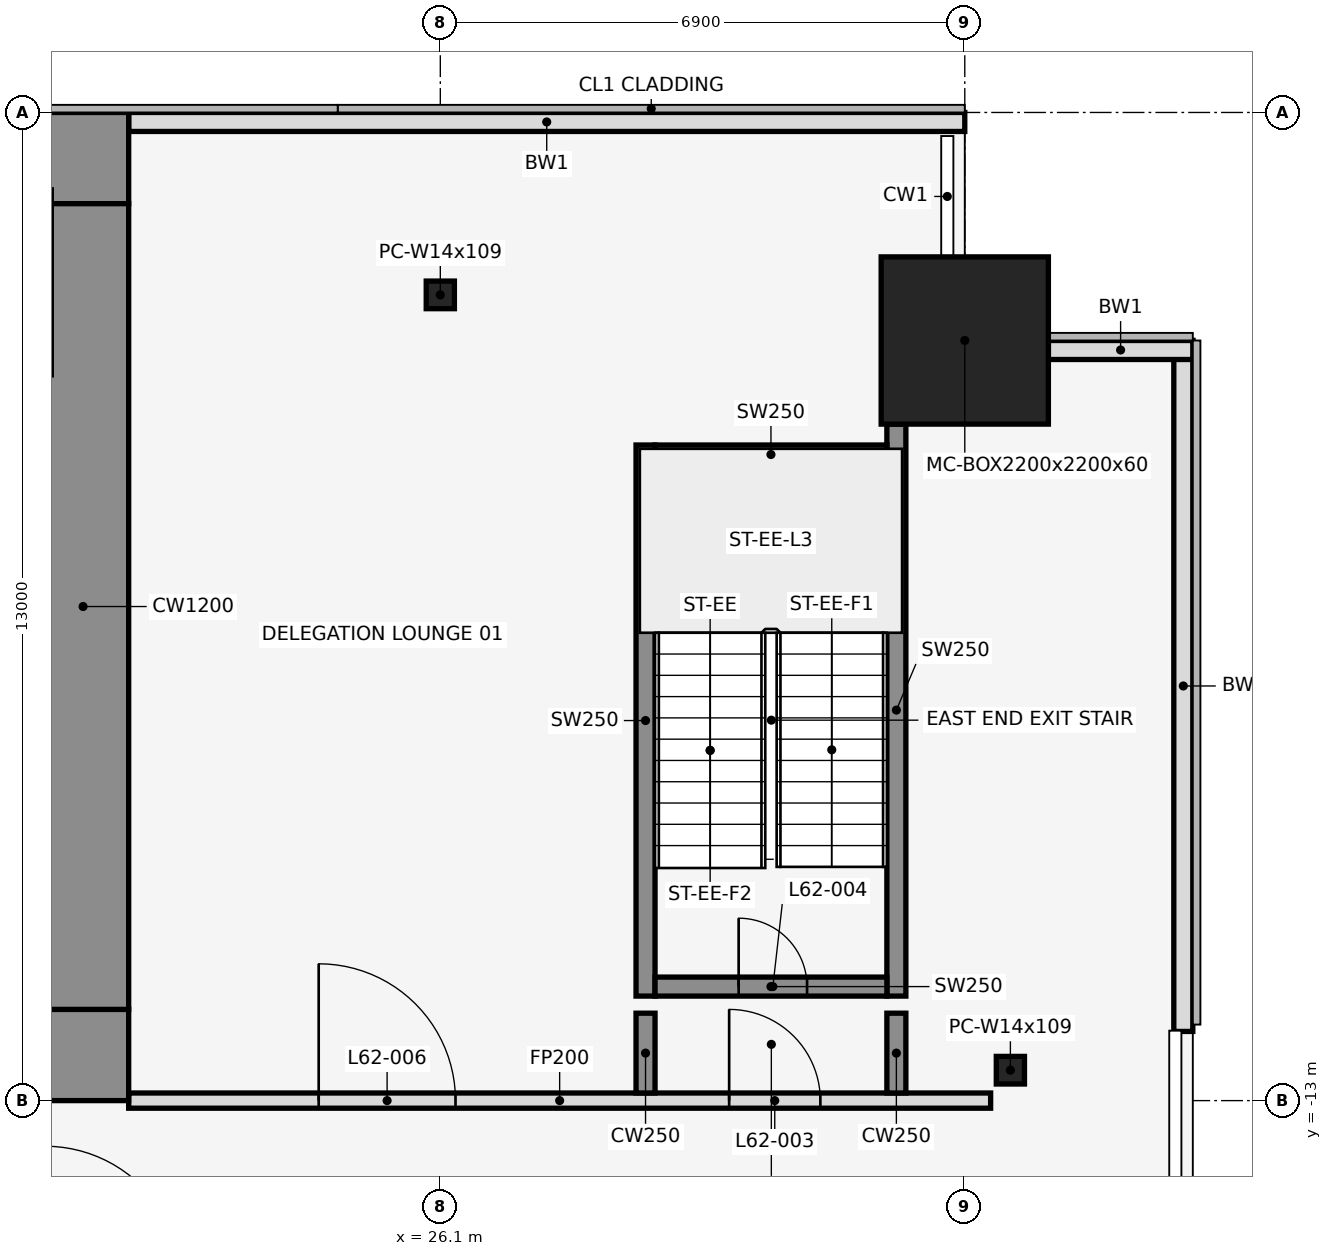
"""IFC4 building model, lengths in metres.
Left out: names, types, materials, properties, quantities, classifications, styles, units other than length and angle.
Written with IfcOpenShell. Run it as: python <this file> out.ifc"""

import sys

from ifc_helpers import new_model, si_unit, direction, frame, frame_2d, origin, origin_2d, place, context, subcontext, project, spatial, rectangle, hollow_rectangle, i_section, extrude, element, fill, save


model = new_model("IFC4")
c1 = context("Model", 3, precision=1e-05, world=origin(), true_north=direction((0.0, 1.0)))
c2 = subcontext(c1, "Body", "Model", "MODEL_VIEW")
j1 = project(units=[si_unit("LENGTHUNIT", "METRE"), si_unit("PLANEANGLEUNIT", "RADIAN")], contexts=[c1])
p1 = place(None, origin())
s1 = spatial("IfcSite", under=j1, at=p1, CompositionType="ELEMENT")
p2 = place(p1, origin())
s2 = spatial("IfcBuilding", under=s1, at=p2, CompositionType="ELEMENT")
p3 = place(p2, frame((0.0, 0.0, 275.0)))
s3 = spatial("IfcBuildingStorey", under=s2, at=p3, CompositionType="ELEMENT", Elevation=275.0)
p4 = place(p3, frame((26.1, -2.4, 0.0), z_axis=(0.0, 0.0, 1.0), x_axis=(1.0, 0.0, 0.0)))
e1 = element("IfcColumn", 1, at=p4, inside=s3, PredefinedType="COLUMN", context=c2, shape_type="SweptSolid", body=[
    extrude(i_section(OverallWidth=0.371, OverallDepth=0.363, WebThickness=0.013, FlangeThickness=0.022, at=origin_2d()), origin(), (0.0, 0.0, 1.0), 4.2),
])
p5 = place(p3, frame((33.0, -3.0, 0.0), z_axis=(0.0, 0.0, 1.0), x_axis=(1.0, 0.0, 0.0)))
e2 = element("IfcColumn", 2, at=p5, inside=s3, PredefinedType="COLUMN", context=c2, shape_type="SweptSolid", body=[
    extrude(hollow_rectangle(XDim=2.2, YDim=2.2, WallThickness=0.06, at=origin_2d()), origin(), (0.0, 0.0, 1.0), 4.2),
])
p6 = place(p3, frame((33.6, -12.6, 0.0), z_axis=(0.0, 0.0, 1.0), x_axis=(1.0, 0.0, 0.0)))
e3 = element("IfcColumn", 3, at=p6, inside=s3, PredefinedType="COLUMN", context=c2, shape_type="SweptSolid", body=[
    extrude(i_section(OverallWidth=0.371, OverallDepth=0.363, WebThickness=0.013, FlangeThickness=0.022, at=origin_2d()), origin(), (0.0, 0.0, 1.0), 4.2),
])
p7 = place(p3, frame((33.0, -0.125, 0.0), z_axis=(0.0, 0.0, 1.0), x_axis=(-1.0, 0.0, 0.0)))
e4 = element("IfcWall", 4, at=p7, inside=s3, PredefinedType="STANDARD", context=c2, shape_type="SweptSolid", body=[
    extrude(rectangle(XDim=11.0, YDim=0.25, at=frame_2d((5.5, 0.0))), origin(), (0.0, 0.0, 1.0), 4.05),
])
p8 = place(p3, frame((35.875, -12.09, 0.0), z_axis=(0.0, 0.0, 1.0), x_axis=(0.0, 1.0, 0.0)))
e5 = element("IfcWall", 5, at=p8, inside=s3, PredefinedType="STANDARD", context=c2, shape_type="SweptSolid", body=[
    extrude(rectangle(XDim=9.09, YDim=0.25, at=frame_2d((4.545, 0.0))), origin(), (0.0, 0.0, 1.0), 4.05),
])
p9 = place(p3, frame((36.0, -3.125, 0.0), z_axis=(0.0, 0.0, 1.0), x_axis=(-1.0, 0.0, 0.0)))
e6 = element("IfcWall", 6, at=p9, inside=s3, PredefinedType="STANDARD", context=c2, shape_type="SweptSolid", body=[
    extrude(rectangle(XDim=1.9, YDim=0.25, at=frame_2d((0.95, 0.0))), origin(), (0.0, 0.0, 1.0), 4.05),
])
p10 = place(p3, frame((28.8, -11.625, 0.0), z_axis=(0.0, 0.0, 1.0), x_axis=(0.0, 1.0, 0.0)))
e7 = element("IfcWall", 7, at=p10, inside=s3, PredefinedType="SHEAR", context=c2, shape_type="SweptSolid", body=[
    extrude(rectangle(XDim=7.25, YDim=0.25, at=frame_2d((3.625, 0.0))), origin(), (0.0, 0.0, 1.0), 4.2),
])
p11 = place(p3, frame((32.1, -11.625, 0.0), z_axis=(0.0, 0.0, 1.0), x_axis=(0.0, 1.0, 0.0)))
e8 = element("IfcWall", 8, at=p11, inside=s3, PredefinedType="SHEAR", context=c2, shape_type="SweptSolid", body=[
    extrude(rectangle(XDim=7.525, YDim=0.25, at=frame_2d((3.762, 0.0))), origin(), (0.0, 0.0, 1.0), 4.2),
])
p12 = place(p3, frame((28.925, -11.5, 0.0), z_axis=(0.0, 0.0, 1.0), x_axis=(1.0, 0.0, 0.0)))
e9 = element("IfcWall", 9, at=p12, inside=s3, PredefinedType="SHEAR", context=c2, shape_type="SweptSolid", body=[
    extrude(rectangle(XDim=3.05, YDim=0.25, at=frame_2d((1.525, 0.0))), origin(), (0.0, 0.0, 1.0), 4.2),
])
p13 = place(p12, frame((1.1, 0.0, 0.0)))
e10 = element("IfcOpeningElement", 10, at=p13, cuts=e9, PredefinedType="OPENING", context=c2, shape_type="SweptSolid", body=[
    extrude(rectangle(XDim=0.9, YDim=2.1, at=frame_2d((0.45, 1.05))), frame((0.0, 0.137, 0.0), z_axis=(0.0, -1.0, 0.0), x_axis=(1.0, 0.0, 0.0)), (0.0, 0.0, 1.0), 0.274),
])
p14 = place(p3, frame((28.925, -4.5, 0.0), z_axis=(0.0, 0.0, 1.0), x_axis=(1.0, 0.0, 0.0)))
e11 = element("IfcWall", 11, at=p14, inside=s3, PredefinedType="SHEAR", context=c2, shape_type="SweptSolid", body=[
    extrude(rectangle(XDim=3.05, YDim=0.25, at=frame_2d((1.525, 0.0))), origin(), (0.0, 0.0, 1.0), 4.2),
])
p15 = place(p3, frame((22.0, -13.0, 0.0), z_axis=(0.0, 0.0, 1.0), x_axis=(1.0, 0.0, 0.0)))
e12 = element("IfcWall", 12, at=p15, inside=s3, PredefinedType="PARTITIONING", context=c2, shape_type="SweptSolid", body=[
    extrude(rectangle(XDim=11.34, YDim=0.2, at=frame_2d((5.67, 0.0))), origin(), (0.0, 0.0, 1.0), 3.118),
])
p16 = place(p15, frame((7.9, 0.0, 0.0)))
e13 = element("IfcOpeningElement", 13, at=p16, cuts=e12, PredefinedType="OPENING", context=c2, shape_type="SweptSolid", body=[
    extrude(rectangle(XDim=1.2, YDim=2.1, at=frame_2d((0.6, 1.05))), frame((0.0, 0.112, 0.0), z_axis=(0.0, -1.0, 0.0), x_axis=(1.0, 0.0, 0.0)), (0.0, 0.0, 1.0), 0.224),
])
p17 = place(p15, frame((2.5, 0.0, 0.0)))
e14 = element("IfcOpeningElement", 14, at=p17, cuts=e12, PredefinedType="OPENING", context=c2, shape_type="SweptSolid", body=[
    extrude(rectangle(XDim=1.8, YDim=2.1, at=frame_2d((0.9, 1.05))), frame((0.0, 0.112, 0.0), z_axis=(0.0, -1.0, 0.0), x_axis=(1.0, 0.0, 0.0)), (0.0, 0.0, 1.0), 0.224),
])
for number, where, z_axis, x_axis in (
    (15, (28.8, -12.9, 0.0), (0.0, 0.0, 1.0), (0.0, 1.0, 0.0)),
    (16, (32.1, -12.9, 0.0), (0.0, 0.0, 1.0), (0.0, 1.0, 0.0)),
):
    element("IfcWall", number, at=place(p3, frame(where, z_axis=z_axis, x_axis=x_axis)), inside=s3, PredefinedType="SHEAR", context=c2, shape_type="SweptSolid", body=[
        extrude(rectangle(XDim=1.05, YDim=0.25, at=frame_2d((0.525, 0.0))), origin(), (0.0, 0.0, 1.0), 4.2),
    ])
p18 = place(p3, frame((-22.0, -0.6, 0.0), z_axis=(0.0, 0.0, 1.0), x_axis=(1.0, 0.0, 0.0)))
e17 = element("IfcWall", 17, at=p18, inside=s3, PredefinedType="SHEAR", context=c2, shape_type="SweptSolid", body=[
    extrude(rectangle(XDim=44.0, YDim=1.2, at=frame_2d((22.0, 0.0))), origin(), (0.0, 0.0, 1.0), 4.2),
])
p19 = place(p18, frame((18.55, 0.0, 0.0)))
e18 = element("IfcOpeningElement", 18, at=p19, cuts=e17, PredefinedType="OPENING", context=c2, shape_type="SweptSolid", body=[
    extrude(rectangle(XDim=0.9, YDim=2.1, at=frame_2d((0.45, 1.05))), frame((0.0, 0.612, 0.0), z_axis=(0.0, -1.0, 0.0), x_axis=(1.0, 0.0, 0.0)), (0.0, 0.0, 1.0), 1.224),
])
p20 = place(p18, frame((24.55, 0.0, 0.0)))
e19 = element("IfcOpeningElement", 19, at=p20, cuts=e17, PredefinedType="OPENING", context=c2, shape_type="SweptSolid", body=[
    extrude(rectangle(XDim=0.9, YDim=2.1, at=frame_2d((0.45, 1.05))), frame((0.0, 0.612, 0.0), z_axis=(0.0, -1.0, 0.0), x_axis=(1.0, 0.0, 0.0)), (0.0, 0.0, 1.0), 1.224),
])
p21 = place(p3, frame((-22.0, -12.4, 0.0), z_axis=(0.0, 0.0, 1.0), x_axis=(1.0, 0.0, 0.0)))
e20 = element("IfcWall", 20, at=p21, inside=s3, PredefinedType="SHEAR", context=c2, shape_type="SweptSolid", body=[
    extrude(rectangle(XDim=44.0, YDim=1.2, at=frame_2d((22.0, 0.0))), origin(), (0.0, 0.0, 1.0), 4.2),
])
p22 = place(p21, frame((2.2, 0.0, 0.0)))
e21 = element("IfcOpeningElement", 21, at=p22, cuts=e20, PredefinedType="OPENING", context=c2, shape_type="SweptSolid", body=[
    extrude(rectangle(XDim=1.2, YDim=2.1, at=frame_2d((0.6, 1.05))), frame((0.0, 0.612, 0.0), z_axis=(0.0, -1.0, 0.0), x_axis=(1.0, 0.0, 0.0)), (0.0, 0.0, 1.0), 1.224),
])
p23 = place(p21, frame((21.4, 0.0, 0.0)))
e22 = element("IfcOpeningElement", 22, at=p23, cuts=e20, PredefinedType="OPENING", context=c2, shape_type="SweptSolid", body=[
    extrude(rectangle(XDim=1.2, YDim=2.1, at=frame_2d((0.6, 1.05))), frame((0.0, 0.612, 0.0), z_axis=(0.0, -1.0, 0.0), x_axis=(1.0, 0.0, 0.0)), (0.0, 0.0, 1.0), 1.224),
])
p24 = place(p21, frame((40.6, 0.0, 0.0)))
e23 = element("IfcOpeningElement", 23, at=p24, cuts=e20, PredefinedType="OPENING", context=c2, shape_type="SweptSolid", body=[
    extrude(rectangle(XDim=1.2, YDim=2.1, at=frame_2d((0.6, 1.05))), frame((0.0, 0.612, 0.0), z_axis=(0.0, -1.0, 0.0), x_axis=(1.0, 0.0, 0.0)), (0.0, 0.0, 1.0), 1.224),
])
p25 = place(p21, frame((16.0, 0.0, 0.0)))
e24 = element("IfcOpeningElement", 24, at=p25, cuts=e20, PredefinedType="OPENING", context=c2, shape_type="SweptSolid", body=[
    extrude(rectangle(XDim=1.8, YDim=2.1, at=frame_2d((0.9, 1.05))), frame((0.0, 0.612, 0.0), z_axis=(0.0, -1.0, 0.0), x_axis=(1.0, 0.0, 0.0)), (0.0, 0.0, 1.0), 1.224),
])
p26 = place(p21, frame((6.3, 0.0, 0.0)))
e25 = element("IfcOpeningElement", 25, at=p26, cuts=e20, PredefinedType="OPENING", context=c2, shape_type="SweptSolid", body=[
    extrude(rectangle(XDim=1.2, YDim=2.1, at=frame_2d((0.6, 1.05))), frame((0.0, 0.612, 0.0), z_axis=(0.0, -1.0, 0.0), x_axis=(1.0, 0.0, 0.0)), (0.0, 0.0, 1.0), 1.224),
])
p27 = place(p21, frame((26.2, 0.0, 0.0)))
e26 = element("IfcOpeningElement", 26, at=p27, cuts=e20, PredefinedType="OPENING", context=c2, shape_type="SweptSolid", body=[
    extrude(rectangle(XDim=1.8, YDim=2.1, at=frame_2d((0.9, 1.05))), frame((0.0, 0.612, 0.0), z_axis=(0.0, -1.0, 0.0), x_axis=(1.0, 0.0, 0.0)), (0.0, 0.0, 1.0), 1.224),
])
p28 = place(p21, frame((36.5, 0.0, 0.0)))
e27 = element("IfcOpeningElement", 27, at=p28, cuts=e20, PredefinedType="OPENING", context=c2, shape_type="SweptSolid", body=[
    extrude(rectangle(XDim=1.2, YDim=2.1, at=frame_2d((0.6, 1.05))), frame((0.0, 0.612, 0.0), z_axis=(0.0, -1.0, 0.0), x_axis=(1.0, 0.0, 0.0)), (0.0, 0.0, 1.0), 1.224),
])
p29 = place(p3, frame((21.4, -11.8, 0.0), z_axis=(0.0, 0.0, 1.0), x_axis=(0.0, 1.0, 0.0)))
e28 = element("IfcWall", 28, at=p29, inside=s3, PredefinedType="SHEAR", context=c2, shape_type="SweptSolid", body=[
    extrude(rectangle(XDim=10.6, YDim=1.2, at=frame_2d((5.3, 0.0))), origin(), (0.0, 0.0, 1.0), 4.2),
])
p30 = place(p16, origin())
e29 = element("IfcDoor", 29, at=p30, inside=s3, OperationType="SINGLE_SWING_RIGHT", PredefinedType="DOOR", context=c2, shape_type="SweptSolid", body=[
    extrude(rectangle(XDim=1.2, YDim=2.1, at=frame_2d((0.6, 1.05))), frame((0.0, 0.025, 0.0), z_axis=(0.0, -1.0, 0.0), x_axis=(1.0, 0.0, 0.0)), (0.0, 0.0, 1.0), 0.05),
])
fill(e13, e29)
p31 = place(p13, origin())
e30 = element("IfcDoor", 30, at=p31, inside=s3, OperationType="SINGLE_SWING_LEFT", PredefinedType="DOOR", context=c2, shape_type="SweptSolid", body=[
    extrude(rectangle(XDim=0.9, YDim=2.1, at=frame_2d((0.45, 1.05))), frame((0.0, 0.025, 0.0), z_axis=(0.0, -1.0, 0.0), x_axis=(1.0, 0.0, 0.0)), (0.0, 0.0, 1.0), 0.05),
])
fill(e10, e30)
p32 = place(p17, origin())
e31 = element("IfcDoor", 31, at=p32, inside=s3, OperationType="SINGLE_SWING_LEFT", PredefinedType="DOOR", context=c2, shape_type="SweptSolid", body=[
    extrude(rectangle(XDim=1.8, YDim=2.1, at=frame_2d((0.9, 1.05))), frame((0.0, 0.025, 0.0), z_axis=(0.0, -1.0, 0.0), x_axis=(1.0, 0.0, 0.0)), (0.0, 0.0, 1.0), 0.05),
])
fill(e14, e31)
save(model, sys.argv[1])
